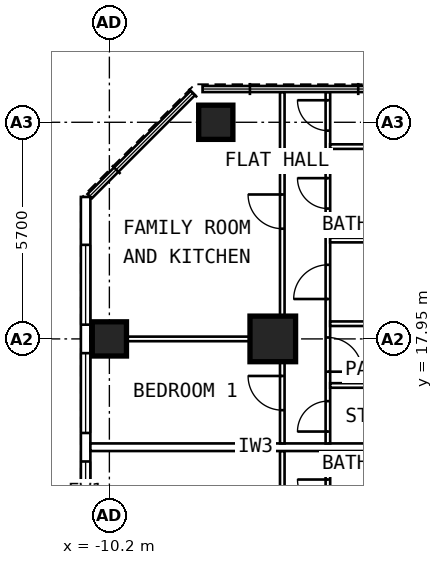
"""IFC4 building model, lengths in metres.
Left out: names, types, materials, properties, quantities, classifications, styles, units other than length and angle.
Written with IfcOpenShell. Run it as: python <this file> out.ifc"""

import sys

from ifc_helpers import new_model, si_unit, direction, frame, frame_2d, origin, origin_2d, place, context, subcontext, project, spatial, rectangle, extrude, element, fill, save


model = new_model("IFC4")
c1 = context("Model", 3, precision=1e-05, world=origin(), true_north=direction((0.0, 1.0)))
c2 = subcontext(c1, "Body", "Model", "MODEL_VIEW")
j1 = project(units=[si_unit("LENGTHUNIT", "METRE"), si_unit("PLANEANGLEUNIT", "RADIAN")], contexts=[c1])
p1 = place(None, origin())
s1 = spatial("IfcSite", under=j1, at=p1, CompositionType="ELEMENT")
p2 = place(p1, origin())
s2 = spatial("IfcBuilding", under=s1, at=p2, CompositionType="ELEMENT")
p3 = place(p2, frame((0.0, 0.0, 138.2)))
s3 = spatial("IfcBuildingStorey", under=s2, at=p3, CompositionType="ELEMENT", Elevation=138.2)
for number, where, z_axis, x_axis in (
    (1, (-10.2, 17.95, 0.0), (0.0, 0.0, 1.0), (0.0, 1.0, 0.0)),
    (2, (-7.4, 23.65, 0.0), (0.0, 0.0, 1.0), (0.0, 1.0, 0.0)),
):
    element("IfcColumn", number, at=place(p3, frame(where, z_axis=z_axis, x_axis=x_axis)), inside=s3, PredefinedType="COLUMN", context=c2, shape_type="SweptSolid", body=[
        extrude(rectangle(XDim=0.9, YDim=0.9, at=origin_2d()), origin(), (0.0, 0.0, 1.0), 3.6),
    ])
p4 = place(p3, frame((-5.9, 17.95, 0.0), z_axis=(0.0, 0.0, 1.0), x_axis=(0.0, 1.0, 0.0)))
e3 = element("IfcColumn", 3, at=p4, inside=s3, PredefinedType="COLUMN", context=c2, shape_type="SweptSolid", body=[
    extrude(rectangle(XDim=1.2, YDim=1.2, at=origin_2d()), origin(), (0.0, 0.0, 1.0), 3.6),
])
p5 = place(p3, frame((-10.825, 6.148, 0.0), z_axis=(0.0, 0.0, 1.0), x_axis=(0.0, 1.0, 0.0)))
e4 = element("IfcWall", 4, at=p5, inside=s3, PredefinedType="SOLIDWALL", context=c2, shape_type="SweptSolid", body=[
    extrude(rectangle(XDim=15.537, YDim=0.25, at=frame_2d((7.769, 0.0))), origin(), (0.0, 0.0, 1.0), 3.35),
])
p6 = place(p5, frame((0.777, 0.0, 0.8)))
e5 = element("IfcOpeningElement", 5, at=p6, cuts=e4, PredefinedType="OPENING", context=c2, shape_type="SweptSolid", body=[
    extrude(rectangle(XDim=2.1, YDim=1.8, at=frame_2d((1.05, 0.9))), frame((0.0, 0.137, 0.0), z_axis=(0.0, -1.0, 0.0), x_axis=(1.0, 0.0, 0.0)), (0.0, 0.0, 1.0), 0.274),
])
p7 = place(p5, frame((3.627, 0.0, 0.8)))
e6 = element("IfcOpeningElement", 6, at=p7, cuts=e4, PredefinedType="OPENING", context=c2, shape_type="SweptSolid", body=[
    extrude(rectangle(XDim=2.1, YDim=1.8, at=frame_2d((1.05, 0.9))), frame((0.0, 0.137, 0.0), z_axis=(0.0, -1.0, 0.0), x_axis=(1.0, 0.0, 0.0)), (0.0, 0.0, 1.0), 0.274),
])
p8 = place(p5, frame((6.477, 0.0, 0.8)))
e7 = element("IfcOpeningElement", 7, at=p8, cuts=e4, PredefinedType="OPENING", context=c2, shape_type="SweptSolid", body=[
    extrude(rectangle(XDim=2.1, YDim=1.8, at=frame_2d((1.05, 0.9))), frame((0.0, 0.137, 0.0), z_axis=(0.0, -1.0, 0.0), x_axis=(1.0, 0.0, 0.0)), (0.0, 0.0, 1.0), 0.274),
])
p9 = place(p5, frame((9.327, 0.0, 0.8)))
e8 = element("IfcOpeningElement", 8, at=p9, cuts=e4, PredefinedType="OPENING", context=c2, shape_type="SweptSolid", body=[
    extrude(rectangle(XDim=2.1, YDim=1.8, at=frame_2d((1.05, 0.9))), frame((0.0, 0.137, 0.0), z_axis=(0.0, -1.0, 0.0), x_axis=(1.0, 0.0, 0.0)), (0.0, 0.0, 1.0), 0.274),
])
p10 = place(p5, frame((12.177, 0.0, 0.8)))
e9 = element("IfcOpeningElement", 9, at=p10, cuts=e4, PredefinedType="OPENING", context=c2, shape_type="SweptSolid", body=[
    extrude(rectangle(XDim=2.1, YDim=1.8, at=frame_2d((1.05, 0.9))), frame((0.0, 0.137, 0.0), z_axis=(0.0, -1.0, 0.0), x_axis=(1.0, 0.0, 0.0)), (0.0, 0.0, 1.0), 0.274),
])
p11 = place(p3, frame((-4.45, 10.05, 0.0), z_axis=(0.0, 0.0, 1.0), x_axis=(0.0, 1.0, 0.0)))
e10 = element("IfcWall", 10, at=p11, inside=s3, PredefinedType="PARTITIONING", context=c2, shape_type="SweptSolid", body=[
    extrude(rectangle(XDim=4.95, YDim=0.12, at=frame_2d((2.475, 0.0))), origin(), (0.0, 0.0, 1.0), 3.35),
])
p12 = place(p11, frame((0.8, 0.0, 0.0)))
e11 = element("IfcOpeningElement", 11, at=p12, cuts=e10, PredefinedType="OPENING", context=c2, shape_type="SweptSolid", body=[
    extrude(rectangle(XDim=0.9, YDim=2.1, at=frame_2d((0.45, 1.05))), frame((0.0, 0.072, 0.0), z_axis=(0.0, -1.0, 0.0), x_axis=(1.0, 0.0, 0.0)), (0.0, 0.0, 1.0), 0.144),
])
p13 = place(p11, frame((3.4, 0.0, 0.0)))
e12 = element("IfcOpeningElement", 12, at=p13, cuts=e10, PredefinedType="OPENING", context=c2, shape_type="SweptSolid", body=[
    extrude(rectangle(XDim=0.8, YDim=2.1, at=frame_2d((0.4, 1.05))), frame((0.0, 0.072, 0.0), z_axis=(0.0, -1.0, 0.0), x_axis=(1.0, 0.0, 0.0)), (0.0, 0.0, 1.0), 0.144),
])
p14 = place(p3, frame((-5.65, 9.6, 0.0), z_axis=(0.0, 0.0, 1.0), x_axis=(0.0, 1.0, 0.0)))
e13 = element("IfcWall", 13, at=p14, inside=s3, PredefinedType="PARTITIONING", context=c2, shape_type="SweptSolid", body=[
    extrude(rectangle(XDim=5.4, YDim=0.12, at=frame_2d((2.7, 0.0))), origin(), (0.0, 0.0, 1.0), 3.35),
])
p15 = place(p14, frame((3.4, 0.0, 0.0)))
e14 = element("IfcOpeningElement", 14, at=p15, cuts=e13, PredefinedType="OPENING", context=c2, shape_type="SweptSolid", body=[
    extrude(rectangle(XDim=0.9, YDim=2.1, at=frame_2d((0.45, 1.05))), frame((0.0, 0.072, 0.0), z_axis=(0.0, -1.0, 0.0), x_axis=(1.0, 0.0, 0.0)), (0.0, 0.0, 1.0), 0.144),
])
p16 = place(p3, frame((-4.45, 15.2, 0.0), z_axis=(0.0, 0.0, 1.0), x_axis=(0.0, 1.0, 0.0)))
e15 = element("IfcWall", 15, at=p16, inside=s3, PredefinedType="PARTITIONING", context=c2, shape_type="SweptSolid", body=[
    extrude(rectangle(XDim=9.245, YDim=0.12, at=frame_2d((4.623, 0.0))), origin(), (0.0, 0.0, 1.0), 3.35),
])
p17 = place(p16, frame((0.312, 0.0, 0.0)))
e16 = element("IfcOpeningElement", 16, at=p17, cuts=e15, PredefinedType="OPENING", context=c2, shape_type="SweptSolid", body=[
    extrude(rectangle(XDim=0.8, YDim=2.1, at=frame_2d((0.4, 1.05))), frame((0.0, 0.072, 0.0), z_axis=(0.0, -1.0, 0.0), x_axis=(1.0, 0.0, 0.0)), (0.0, 0.0, 1.0), 0.144),
])
p18 = place(p16, frame((1.887, 0.0, 0.0)))
e17 = element("IfcOpeningElement", 17, at=p18, cuts=e15, PredefinedType="OPENING", context=c2, shape_type="SweptSolid", body=[
    extrude(rectangle(XDim=0.9, YDim=2.1, at=frame_2d((0.45, 1.05))), frame((0.0, 0.072, 0.0), z_axis=(0.0, -1.0, 0.0), x_axis=(1.0, 0.0, 0.0)), (0.0, 0.0, 1.0), 0.144),
])
p19 = place(p16, frame((3.8, 0.0, 0.0)))
e18 = element("IfcOpeningElement", 18, at=p19, cuts=e15, PredefinedType="OPENING", context=c2, shape_type="SweptSolid", body=[
    extrude(rectangle(XDim=0.9, YDim=2.1, at=frame_2d((0.45, 1.05))), frame((0.0, 0.072, 0.0), z_axis=(0.0, -1.0, 0.0), x_axis=(1.0, 0.0, 0.0)), (0.0, 0.0, 1.0), 0.144),
])
p20 = place(p16, frame((6.18, 0.0, 0.0)))
e19 = element("IfcOpeningElement", 19, at=p20, cuts=e15, PredefinedType="OPENING", context=c2, shape_type="SweptSolid", body=[
    extrude(rectangle(XDim=0.8, YDim=2.1, at=frame_2d((0.4, 1.05))), frame((0.0, 0.072, 0.0), z_axis=(0.0, -1.0, 0.0), x_axis=(1.0, 0.0, 0.0)), (0.0, 0.0, 1.0), 0.144),
])
p21 = place(p16, frame((8.23, 0.0, 0.0)))
e20 = element("IfcOpeningElement", 20, at=p21, cuts=e15, PredefinedType="OPENING", context=c2, shape_type="SweptSolid", body=[
    extrude(rectangle(XDim=0.8, YDim=2.1, at=frame_2d((0.4, 1.05))), frame((0.0, 0.072, 0.0), z_axis=(0.0, -1.0, 0.0), x_axis=(1.0, 0.0, 0.0)), (0.0, 0.0, 1.0), 0.144),
])
p22 = place(p3, frame((-5.65, 15.2, 0.0), z_axis=(0.0, 0.0, 1.0), x_axis=(0.0, 1.0, 0.0)))
e21 = element("IfcWall", 21, at=p22, inside=s3, PredefinedType="PARTITIONING", context=c2, shape_type="SweptSolid", body=[
    extrude(rectangle(XDim=9.245, YDim=0.12, at=frame_2d((4.623, 0.0))), origin(), (0.0, 0.0, 1.0), 3.35),
])
p23 = place(p22, frame((0.875, 0.0, 0.0)))
e22 = element("IfcOpeningElement", 22, at=p23, cuts=e21, PredefinedType="OPENING", context=c2, shape_type="SweptSolid", body=[
    extrude(rectangle(XDim=0.9, YDim=2.1, at=frame_2d((0.45, 1.05))), frame((0.0, 0.072, 0.0), z_axis=(0.0, -1.0, 0.0), x_axis=(1.0, 0.0, 0.0)), (0.0, 0.0, 1.0), 0.144),
])
p24 = place(p22, frame((5.65, 0.0, 0.0)))
e23 = element("IfcOpeningElement", 23, at=p24, cuts=e21, PredefinedType="OPENING", context=c2, shape_type="SweptSolid", body=[
    extrude(rectangle(XDim=0.9, YDim=2.1, at=frame_2d((0.45, 1.05))), frame((0.0, 0.072, 0.0), z_axis=(0.0, -1.0, 0.0), x_axis=(1.0, 0.0, 0.0)), (0.0, 0.0, 1.0), 0.144),
])
p25 = place(p3, frame((-5.71, 17.95, 0.0), z_axis=(0.0, 0.0, 1.0), x_axis=(-1.0, 0.0, 0.0)))
e24 = element("IfcWall", 24, at=p25, inside=s3, PredefinedType="PARTITIONING", context=c2, shape_type="SweptSolid", body=[
    extrude(rectangle(XDim=4.99, YDim=0.12, at=frame_2d((2.495, 0.0))), origin(), (0.0, 0.0, 1.0), 2.45),
])
for number, where, z_axis, x_axis in (
    (25, (-2.0, 16.725, 0.0), (0.0, 0.0, 1.0), (-1.0, 0.0, 0.0)),
    (26, (-2.0, 18.35, 0.0), (0.0, 0.0, 1.0), (-1.0, 0.0, 0.0)),
    (27, (-2.0, 20.55, 0.0), (0.0, 0.0, 1.0), (-1.0, 0.0, 0.0)),
    (28, (-2.0, 23.01, 0.0), (0.0, 0.0, 1.0), (-1.0, 0.0, 0.0)),
):
    element("IfcWall", number, at=place(p3, frame(where, z_axis=z_axis, x_axis=x_axis)), inside=s3, PredefinedType="PARTITIONING", context=c2, shape_type="SweptSolid", body=[
        extrude(rectangle(XDim=2.39, YDim=0.12, at=frame_2d((1.195, 0.0))), origin(), (0.0, 0.0, 1.0), 3.35),
    ])
p26 = place(p3, frame((-2.0, 15.1, 0.0), z_axis=(0.0, 0.0, 1.0), x_axis=(-1.0, 0.0, 0.0)))
e29 = element("IfcWall", 29, at=p26, inside=s3, PredefinedType="PARTITIONING", context=c2, shape_type="SweptSolid", body=[
    extrude(rectangle(XDim=8.7, YDim=0.2, at=frame_2d((4.35, 0.0))), origin(), (0.0, 0.0, 1.0), 3.35),
])
p27 = place(p8, origin())
e30 = element("IfcWindow", 30, at=p27, inside=s3, PartitioningType="SINGLE_PANEL", PredefinedType="WINDOW", context=c2, shape_type="SweptSolid", body=[
    extrude(rectangle(XDim=2.1, YDim=1.8, at=frame_2d((1.05, 0.9))), frame((0.0, 0.03, 0.0), z_axis=(0.0, -1.0, 0.0), x_axis=(1.0, 0.0, 0.0)), (0.0, 0.0, 1.0), 0.06),
])
fill(e7, e30)
p28 = place(p9, origin())
e31 = element("IfcWindow", 31, at=p28, inside=s3, PartitioningType="SINGLE_PANEL", PredefinedType="WINDOW", context=c2, shape_type="SweptSolid", body=[
    extrude(rectangle(XDim=2.1, YDim=1.8, at=frame_2d((1.05, 0.9))), frame((0.0, 0.03, 0.0), z_axis=(0.0, -1.0, 0.0), x_axis=(1.0, 0.0, 0.0)), (0.0, 0.0, 1.0), 0.06),
])
fill(e8, e31)
p29 = place(p10, origin())
e32 = element("IfcWindow", 32, at=p29, inside=s3, PartitioningType="SINGLE_PANEL", PredefinedType="WINDOW", context=c2, shape_type="SweptSolid", body=[
    extrude(rectangle(XDim=2.1, YDim=1.8, at=frame_2d((1.05, 0.9))), frame((0.0, 0.03, 0.0), z_axis=(0.0, -1.0, 0.0), x_axis=(1.0, 0.0, 0.0)), (0.0, 0.0, 1.0), 0.06),
])
fill(e9, e32)
p30 = place(p13, origin())
e33 = element("IfcDoor", 33, at=p30, inside=s3, OperationType="SINGLE_SWING_RIGHT", PredefinedType="DOOR", context=c2, shape_type="SweptSolid", body=[
    extrude(rectangle(XDim=0.8, YDim=2.1, at=frame_2d((0.4, 1.05))), frame((0.0, 0.025, 0.0), z_axis=(0.0, -1.0, 0.0), x_axis=(1.0, 0.0, 0.0)), (0.0, 0.0, 1.0), 0.05),
])
fill(e12, e33)
p31 = place(p23, origin())
e34 = element("IfcDoor", 34, at=p31, inside=s3, OperationType="SINGLE_SWING_RIGHT", PredefinedType="DOOR", context=c2, shape_type="SweptSolid", body=[
    extrude(rectangle(XDim=0.9, YDim=2.1, at=frame_2d((0.45, 1.05))), frame((0.0, 0.025, 0.0), z_axis=(0.0, -1.0, 0.0), x_axis=(1.0, 0.0, 0.0)), (0.0, 0.0, 1.0), 0.05),
])
fill(e22, e34)
p32 = place(p24, origin())
e35 = element("IfcDoor", 35, at=p32, inside=s3, OperationType="SINGLE_SWING_RIGHT", PredefinedType="DOOR", context=c2, shape_type="SweptSolid", body=[
    extrude(rectangle(XDim=0.9, YDim=2.1, at=frame_2d((0.45, 1.05))), frame((0.0, 0.025, 0.0), z_axis=(0.0, -1.0, 0.0), x_axis=(1.0, 0.0, 0.0)), (0.0, 0.0, 1.0), 0.05),
])
fill(e23, e35)
p33 = place(p17, origin())
e36 = element("IfcDoor", 36, at=p33, inside=s3, OperationType="SINGLE_SWING_LEFT", PredefinedType="DOOR", context=c2, shape_type="SweptSolid", body=[
    extrude(rectangle(XDim=0.8, YDim=2.1, at=frame_2d((0.4, 1.05))), frame((0.0, 0.025, 0.0), z_axis=(0.0, -1.0, 0.0), x_axis=(1.0, 0.0, 0.0)), (0.0, 0.0, 1.0), 0.05),
])
fill(e16, e36)
p34 = place(p18, frame((0.9, 0.0, 0.0), z_axis=(0.0, 0.0, 1.0), x_axis=(-1.0, 0.0, 0.0)))
e37 = element("IfcDoor", 37, at=p34, inside=s3, OperationType="SINGLE_SWING_RIGHT", PredefinedType="DOOR", context=c2, shape_type="SweptSolid", body=[
    extrude(rectangle(XDim=0.9, YDim=2.1, at=frame_2d((0.45, 1.05))), frame((0.0, 0.025, 0.0), z_axis=(0.0, -1.0, 0.0), x_axis=(1.0, 0.0, 0.0)), (0.0, 0.0, 1.0), 0.05),
])
fill(e17, e37)
p35 = place(p19, origin())
e38 = element("IfcDoor", 38, at=p35, inside=s3, OperationType="SINGLE_SWING_LEFT", PredefinedType="DOOR", context=c2, shape_type="SweptSolid", body=[
    extrude(rectangle(XDim=0.9, YDim=2.1, at=frame_2d((0.45, 1.05))), frame((0.0, 0.025, 0.0), z_axis=(0.0, -1.0, 0.0), x_axis=(1.0, 0.0, 0.0)), (0.0, 0.0, 1.0), 0.05),
])
fill(e18, e38)
p36 = place(p20, origin())
e39 = element("IfcDoor", 39, at=p36, inside=s3, OperationType="SINGLE_SWING_RIGHT", PredefinedType="DOOR", context=c2, shape_type="SweptSolid", body=[
    extrude(rectangle(XDim=0.8, YDim=2.1, at=frame_2d((0.4, 1.05))), frame((0.0, 0.025, 0.0), z_axis=(0.0, -1.0, 0.0), x_axis=(1.0, 0.0, 0.0)), (0.0, 0.0, 1.0), 0.05),
])
fill(e19, e39)
p37 = place(p21, origin())
e40 = element("IfcDoor", 40, at=p37, inside=s3, OperationType="SINGLE_SWING_RIGHT", PredefinedType="DOOR", context=c2, shape_type="SweptSolid", body=[
    extrude(rectangle(XDim=0.8, YDim=2.1, at=frame_2d((0.4, 1.05))), frame((0.0, 0.025, 0.0), z_axis=(0.0, -1.0, 0.0), x_axis=(1.0, 0.0, 0.0)), (0.0, 0.0, 1.0), 0.05),
])
fill(e20, e40)
save(model, sys.argv[1])
